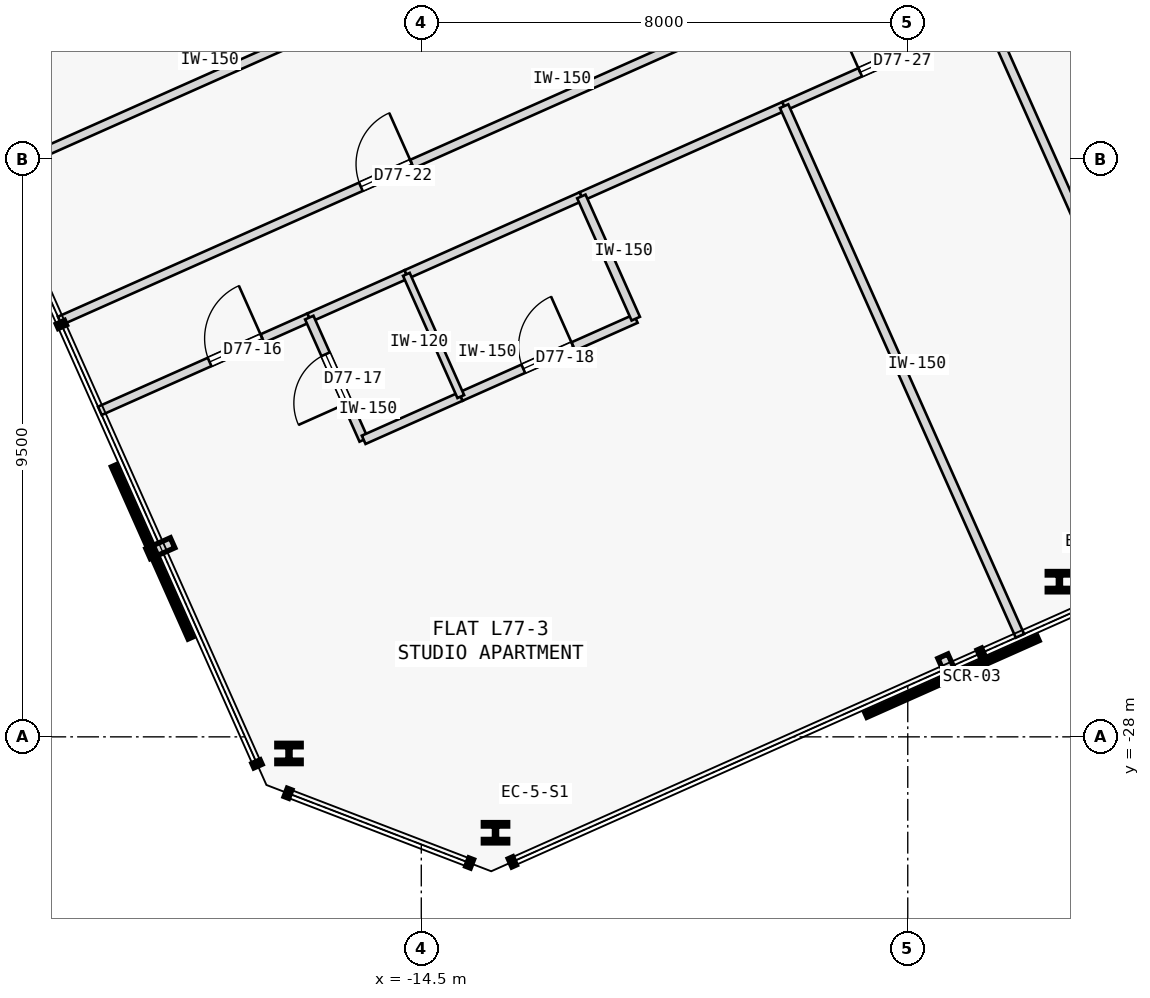
"""IFC4 building model, lengths in metres.
Left out: names, types, materials, properties, quantities, classifications, styles, units other than length and angle.
Written with IfcOpenShell. Run it as: python <this file> out.ifc"""

import sys

from ifc_helpers import new_model, si_unit, direction, frame, frame_2d, origin, origin_2d, place, context, subcontext, project, spatial, rectangle, i_section, extrude, element, fill, save


model = new_model("IFC4")
c1 = context("Model", 3, precision=1e-05, world=origin(), true_north=direction((0.0, 1.0)))
c2 = subcontext(c1, "Body", "Model", "MODEL_VIEW")
j1 = project(units=[si_unit("LENGTHUNIT", "METRE"), si_unit("PLANEANGLEUNIT", "RADIAN")], contexts=[c1])
p1 = place(None, origin())
s1 = spatial("IfcSite", under=j1, at=p1, CompositionType="ELEMENT")
p2 = place(p1, origin())
s2 = spatial("IfcBuilding", under=s1, at=p2, CompositionType="ELEMENT")
p3 = place(p2, frame((0.0, 0.0, 288.6)))
s3 = spatial("IfcBuildingStorey", under=s2, at=p3, CompositionType="ELEMENT", Elevation=288.6)
for number, where, z_axis, x_axis in (
    (1, (-13.28, -29.577, 0.0), (0.0, 0.0, 1.0), (1.0, 0.0, 0.0)),
    (2, (-4.006, -25.448, 0.0), (0.0, 0.0, 1.0), (1.0, 0.0, 0.0)),
    (3, (-16.676, -28.273, 0.0), (0.0, 0.0, 1.0), (1.0, 0.0, 0.0)),
):
    element("IfcColumn", number, at=place(p3, frame(where, z_axis=z_axis, x_axis=x_axis)), inside=s3, PredefinedType="COLUMN", context=c2, shape_type="SweptSolid", body=[
        extrude(i_section(OverallWidth=0.401, OverallDepth=0.335, WebThickness=0.036, FlangeThickness=0.058, FilletRadius=0.015, at=origin_2d()), origin(), (0.0, 0.0, 1.0), 3.35),
    ])
p4 = place(p3, frame((-19.786, -22.639, 0.0), z_axis=(0.0, 0.0, 1.0), x_axis=(0.913541633228, 0.406745232743, 0.0)))
e4 = element("IfcWall", 4, at=p4, inside=s3, PredefinedType="PARTITIONING", context=c2, shape_type="SweptSolid", body=[
    extrude(rectangle(XDim=3.77, YDim=0.15, at=frame_2d((1.885, 0.0))), origin(), (0.0, 0.0, 1.0), 3.125),
])
p5 = place(p4, frame((1.976, 0.0, 0.0)))
e5 = element("IfcOpeningElement", 5, at=p5, cuts=e4, PredefinedType="OPENING", context=c2, shape_type="SweptSolid", body=[
    extrude(rectangle(XDim=0.95, YDim=2.15, at=frame_2d((0.475, 1.075))), frame((0.0, 0.085, 0.0), z_axis=(0.0, -1.0, 0.0), x_axis=(1.0, 0.0, 0.0)), (0.0, 0.0, 1.0), 0.17),
])
p6 = place(p3, frame((-11.868, -19.113, 0.0), z_axis=(0.0, 0.0, 1.0), x_axis=(0.913543802, 0.40674036169, 0.0)))
e6 = element("IfcWall", 6, at=p6, inside=s3, PredefinedType="PARTITIONING", context=c2, shape_type="SweptSolid", body=[
    extrude(rectangle(XDim=3.65, YDim=0.15, at=frame_2d((1.825, 0.0))), origin(), (0.0, 0.0, 1.0), 3.125),
])
p7 = place(p3, frame((-16.342, -21.105, 0.0), z_axis=(0.0, 0.0, 1.0), x_axis=(0.9135579554, 0.406708571492, 0.0)))
e7 = element("IfcWall", 7, at=p7, inside=s3, PredefinedType="PARTITIONING", context=c2, shape_type="SweptSolid", body=[
    extrude(rectangle(XDim=1.748, YDim=0.15, at=frame_2d((0.874, 0.0))), origin(), (0.0, 0.0, 1.0), 3.125),
])
p8 = place(p3, frame((-14.745, -20.394, 0.0), z_axis=(0.0, 0.0, 1.0), x_axis=(0.913542880558, 0.406742431252, 0.0)))
e8 = element("IfcWall", 8, at=p8, inside=s3, PredefinedType="PARTITIONING", context=c2, shape_type="SweptSolid", body=[
    extrude(rectangle(XDim=3.15, YDim=0.15, at=frame_2d((1.575, 0.0))), origin(), (0.0, 0.0, 1.0), 3.125),
])
p9 = place(p3, frame((-20.445, -21.159, 0.0), z_axis=(0.0, 0.0, 1.0), x_axis=(0.913547681516, 0.406731648137, 0.0)))
e9 = element("IfcWall", 9, at=p9, inside=s3, PredefinedType="PARTITIONING", context=c2, shape_type="SweptSolid", body=[
    extrude(rectangle(XDim=11.76, YDim=0.15, at=frame_2d((5.88, 0.0))), origin(), (0.0, 0.0, 1.0), 3.125),
])
p10 = place(p9, frame((5.42, 0.0, 0.0)))
e10 = element("IfcOpeningElement", 10, at=p10, cuts=e9, PredefinedType="OPENING", context=c2, shape_type="SweptSolid", body=[
    extrude(rectangle(XDim=0.92, YDim=2.15, at=frame_2d((0.46, 1.075))), frame((0.0, 0.085, 0.0), z_axis=(0.0, -1.0, 0.0), x_axis=(1.0, 0.0, 0.0)), (0.0, 0.0, 1.0), 0.17),
])
p11 = place(p3, frame((-8.533, -17.628, 0.0), z_axis=(0.0, 0.0, 1.0), x_axis=(0.913560976273, 0.406701785873, 0.0)))
e11 = element("IfcWall", 11, at=p11, inside=s3, PredefinedType="PARTITIONING", context=c2, shape_type="SweptSolid", body=[
    extrude(rectangle(XDim=3.659, YDim=0.15, at=frame_2d((1.829, 0.0))), origin(), (0.0, 0.0, 1.0), 3.125),
])
p12 = place(p11, frame((1.369, 0.0, 0.0)))
e12 = element("IfcOpeningElement", 12, at=p12, cuts=e11, PredefinedType="OPENING", context=c2, shape_type="SweptSolid", body=[
    extrude(rectangle(XDim=0.92, YDim=2.15, at=frame_2d((0.46, 1.075))), frame((0.0, 0.085, 0.0), z_axis=(0.0, -1.0, 0.0), x_axis=(1.0, 0.0, 0.0)), (0.0, 0.0, 1.0), 0.17),
])
p13 = place(p3, frame((-15.448, -23.115, 0.0), z_axis=(0.0, 0.0, 1.0), x_axis=(-0.406725294076, 0.913550510459, 0.0)))
e13 = element("IfcWall", 13, at=p13, inside=s3, PredefinedType="PARTITIONING", context=c2, shape_type="SweptSolid", body=[
    extrude(rectangle(XDim=2.2, YDim=0.15, at=frame_2d((1.1, 0.0))), origin(), (0.0, 0.0, 1.0), 3.125),
])
p14 = place(p13, frame((0.66, 0.0, 0.0)))
e14 = element("IfcOpeningElement", 14, at=p14, cuts=e13, PredefinedType="OPENING", context=c2, shape_type="SweptSolid", body=[
    extrude(rectangle(XDim=0.88, YDim=2.15, at=frame_2d((0.44, 1.075))), frame((0.0, 0.085, 0.0), z_axis=(0.0, -1.0, 0.0), x_axis=(1.0, 0.0, 0.0)), (0.0, 0.0, 1.0), 0.17),
])
p15 = place(p3, frame((-15.448, -23.115, 0.0), z_axis=(0.0, 0.0, 1.0), x_axis=(0.9135579554, 0.406708571492, 0.0)))
e15 = element("IfcWall", 15, at=p15, inside=s3, PredefinedType="PARTITIONING", context=c2, shape_type="SweptSolid", body=[
    extrude(rectangle(XDim=1.748, YDim=0.15, at=frame_2d((0.874, 0.0))), origin(), (0.0, 0.0, 1.0), 3.125),
])
p16 = place(p3, frame((-13.851, -22.404, 0.0), z_axis=(0.0, 0.0, 1.0), x_axis=(0.913542880558, 0.406742431252, 0.0)))
e16 = element("IfcWall", 16, at=p16, inside=s3, PredefinedType="PARTITIONING", context=c2, shape_type="SweptSolid", body=[
    extrude(rectangle(XDim=3.15, YDim=0.15, at=frame_2d((1.575, 0.0))), origin(), (0.0, 0.0, 1.0), 3.125),
])
p17 = place(p16, frame((1.125, 0.0, 0.0)))
e17 = element("IfcOpeningElement", 17, at=p17, cuts=e16, PredefinedType="OPENING", context=c2, shape_type="SweptSolid", body=[
    extrude(rectangle(XDim=0.9, YDim=2.15, at=frame_2d((0.45, 1.075))), frame((0.0, 0.085, 0.0), z_axis=(0.0, -1.0, 0.0), x_axis=(1.0, 0.0, 0.0)), (0.0, 0.0, 1.0), 0.17),
])
p18 = place(p3, frame((-10.973, -21.123, 0.0), z_axis=(0.0, 0.0, 1.0), x_axis=(-0.406725294076, 0.913550510459, 0.0)))
e18 = element("IfcWall", 18, at=p18, inside=s3, PredefinedType="PARTITIONING", context=c2, shape_type="SweptSolid", body=[
    extrude(rectangle(XDim=2.2, YDim=0.15, at=frame_2d((1.1, 0.0))), origin(), (0.0, 0.0, 1.0), 3.125),
])
p19 = place(p3, frame((-4.655, -26.339, 0.0), z_axis=(0.0, 0.0, 1.0), x_axis=(-0.406729927653, 0.913548447512, 0.0)))
e19 = element("IfcWall", 19, at=p19, inside=s3, PredefinedType="PARTITIONING", context=c2, shape_type="SweptSolid", body=[
    extrude(rectangle(XDim=9.535, YDim=0.15, at=frame_2d((4.768, 0.0))), origin(), (0.0, 0.0, 1.0), 3.125),
])
p20 = place(p3, frame((-13.851, -22.404, 0.0), z_axis=(0.0, 0.0, 1.0), x_axis=(-0.406725294076, 0.913550510459, 0.0)))
e20 = element("IfcWall", 20, at=p20, inside=s3, PredefinedType="PARTITIONING", context=c2, shape_type="SweptSolid", body=[
    extrude(rectangle(XDim=2.2, YDim=0.12, at=frame_2d((1.1, 0.0))), origin(), (0.0, 0.0, 1.0), 3.125),
])
p21 = place(p3, frame((-21.52, -18.744, 0.0), z_axis=(0.0, 0.0, 1.0), x_axis=(0.913539967617, 0.406748973651, 0.0)))
e21 = element("IfcWall", 21, at=p21, inside=s3, PredefinedType="PARTITIONING", context=c2, shape_type="SweptSolid", body=[
    extrude(rectangle(XDim=11.76, YDim=0.15, at=frame_2d((5.88, 0.0))), origin(), (0.0, 0.0, 1.0), 3.125),
])
p22 = place(p21, frame((5.42, 0.0, 0.0)))
e22 = element("IfcOpeningElement", 22, at=p22, cuts=e21, PredefinedType="OPENING", context=c2, shape_type="SweptSolid", body=[
    extrude(rectangle(XDim=0.92, YDim=2.15, at=frame_2d((0.46, 1.075))), frame((0.0, 0.085, 0.0), z_axis=(0.0, -1.0, 0.0), x_axis=(1.0, 0.0, 0.0)), (0.0, 0.0, 1.0), 0.17),
])
p23 = place(p3, frame((-1.312, -24.851, 0.0), z_axis=(0.0, 0.0, 1.0), x_axis=(-0.406760810574, 0.913534697196, 0.0)))
e23 = element("IfcWall", 23, at=p23, inside=s3, PredefinedType="PARTITIONING", context=c2, shape_type="SweptSolid", body=[
    extrude(rectangle(XDim=9.535, YDim=0.15, at=frame_2d((4.768, 0.0))), origin(), (0.0, 0.0, 1.0), 3.125),
])
p24 = place(p5, origin())
e24 = element("IfcDoor", 24, at=p24, inside=s3, OperationType="SINGLE_SWING_RIGHT", PredefinedType="DOOR", context=c2, shape_type="SweptSolid", body=[
    extrude(rectangle(XDim=0.95, YDim=2.15, at=frame_2d((0.475, 1.075))), frame((0.0, 0.025, 0.0), z_axis=(0.0, -1.0, 0.0), x_axis=(1.0, 0.0, 0.0)), (0.0, 0.0, 1.0), 0.05),
])
fill(e5, e24)
p25 = place(p14, origin())
e25 = element("IfcDoor", 25, at=p25, inside=s3, OperationType="SINGLE_SWING_LEFT", PredefinedType="DOOR", context=c2, shape_type="SweptSolid", body=[
    extrude(rectangle(XDim=0.88, YDim=2.15, at=frame_2d((0.44, 1.075))), frame((0.0, 0.025, 0.0), z_axis=(0.0, -1.0, 0.0), x_axis=(1.0, 0.0, 0.0)), (0.0, 0.0, 1.0), 0.05),
])
fill(e14, e25)
p26 = place(p17, origin())
e26 = element("IfcDoor", 26, at=p26, inside=s3, OperationType="SINGLE_SWING_RIGHT", PredefinedType="DOOR", context=c2, shape_type="SweptSolid", body=[
    extrude(rectangle(XDim=0.9, YDim=2.15, at=frame_2d((0.45, 1.075))), frame((0.0, 0.025, 0.0), z_axis=(0.0, -1.0, 0.0), x_axis=(1.0, 0.0, 0.0)), (0.0, 0.0, 1.0), 0.05),
])
fill(e17, e26)
p27 = place(p10, origin())
e27 = element("IfcDoor", 27, at=p27, inside=s3, OperationType="SINGLE_SWING_RIGHT", PredefinedType="DOOR", context=c2, shape_type="SweptSolid", body=[
    extrude(rectangle(XDim=0.92, YDim=2.15, at=frame_2d((0.46, 1.075))), frame((0.0, 0.025, 0.0), z_axis=(0.0, -1.0, 0.0), x_axis=(1.0, 0.0, 0.0)), (0.0, 0.0, 1.0), 0.05),
])
fill(e10, e27)
p28 = place(p12, origin())
e28 = element("IfcDoor", 28, at=p28, inside=s3, OperationType="SINGLE_SWING_LEFT", PredefinedType="DOOR", context=c2, shape_type="SweptSolid", body=[
    extrude(rectangle(XDim=0.92, YDim=2.15, at=frame_2d((0.46, 1.075))), frame((0.0, 0.025, 0.0), z_axis=(0.0, -1.0, 0.0), x_axis=(1.0, 0.0, 0.0)), (0.0, 0.0, 1.0), 0.05),
])
fill(e12, e28)
save(model, sys.argv[1])
